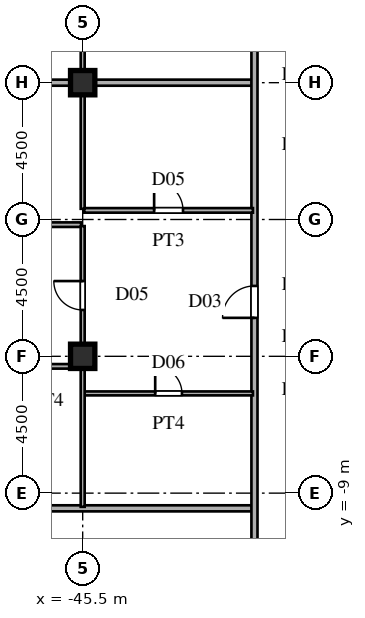
"""IFC4 building model, lengths in metres.
Left out: names, types, materials, properties, quantities, classifications, styles, units other than length and angle.
Written with IfcOpenShell. Run it as: python <this file> out.ifc"""

import sys

from ifc_helpers import new_model, si_unit, direction, frame, frame_2d, origin, origin_2d, place, context, subcontext, project, spatial, rectangle, i_section, extrude, source, transform, mapped, element, fill, save


model = new_model("IFC4")
c1 = context("Model", 3, precision=1e-05, world=origin(), true_north=direction((0.0, 1.0)))
c2 = subcontext(c1, "Body", "Model", "MODEL_VIEW")
j1 = project(units=[si_unit("LENGTHUNIT", "METRE"), si_unit("PLANEANGLEUNIT", "RADIAN")], contexts=[c1])
p1 = place(None, origin())
s1 = spatial("IfcSite", under=j1, at=p1, CompositionType="ELEMENT")
p2 = place(p1, origin())
s2 = spatial("IfcBuilding", under=s1, at=p2, CompositionType="ELEMENT")
p3 = place(p2, frame((0.0, 0.0, 80.1)))
s3 = spatial("IfcBuildingStorey", under=s2, at=p3, CompositionType="ELEMENT", Elevation=80.1)
m1 = source(origin(), c2, "Body", "SweptSolid", [
    extrude(i_section(OverallWidth=0.8, OverallDepth=0.8, WebThickness=0.032, FlangeThickness=0.05, at=origin_2d()), origin(), (0.0, 0.0, 1.0), 3.6),
])
for number, where, z_axis, x_axis in (
    (1, (-45.5, -4.5, 0.0), (0.0, 0.0, 1.0), (1.0, 0.0, 0.0)),
    (2, (-45.5, 4.5, 0.0), (0.0, 0.0, 1.0), (1.0, 0.0, 0.0)),
):
    element("IfcColumn", number, at=place(p3, frame(where, z_axis=z_axis, x_axis=x_axis)), inside=s3, PredefinedType="COLUMN", context=c2, shape_type="MappedRepresentation", body=[
        mapped(m1, transform((0.0, 0.0, 0.0), scale=1.0)),
    ])
p4 = place(p3, frame((-66.568, -9.5, 0.0), z_axis=(0.0, 0.0, 1.0), x_axis=(1.0, 0.0, 0.0)))
e3 = element("IfcWall", 3, at=p4, inside=s3, PredefinedType="PARTITIONING", context=c2, shape_type="SweptSolid", body=[
    extrude(rectangle(XDim=26.638, YDim=0.2, at=frame_2d((13.319, 0.0))), origin(), (0.0, 0.0, 1.0), 3.38),
])
p5 = place(p3, frame((-45.45, -5.72, 0.0), z_axis=(0.0, 0.0, 1.0), x_axis=(1.0, 0.0, 0.0)))
e4 = element("IfcWall", 4, at=p5, inside=s3, PredefinedType="PARTITIONING", context=c2, shape_type="SweptSolid", body=[
    extrude(rectangle(XDim=5.55, YDim=0.13, at=frame_2d((2.775, 0.0))), origin(), (0.0, 0.0, 1.0), 3.38),
])
p6 = place(p5, frame((2.335, 0.0, 0.0)))
e5 = element("IfcOpeningElement", 5, at=p6, cuts=e4, PredefinedType="OPENING", context=c2, shape_type="SweptSolid", body=[
    extrude(rectangle(XDim=0.88, YDim=2.1, at=frame_2d((0.44, 1.05))), frame((0.0, 0.075, 0.0), z_axis=(0.0, -1.0, 0.0), x_axis=(1.0, 0.0, 0.0)), (0.0, 0.0, 1.0), 0.15),
])
p7 = place(p3, frame((-71.035, -4.83, 0.0), z_axis=(0.0, 0.0, 1.0), x_axis=(1.0, 0.0, 0.0)))
e6 = element("IfcWall", 6, at=p7, inside=s3, PredefinedType="PARTITIONING", context=c2, shape_type="SweptSolid", body=[
    extrude(rectangle(XDim=25.485, YDim=0.15, at=frame_2d((12.742, 0.0))), origin(), (0.0, 0.0, 1.0), 3.38),
])
p8 = place(p7, frame((20.56, 0.0, 0.0)))
e7 = element("IfcOpeningElement", 7, at=p8, cuts=e6, PredefinedType="OPENING", context=c2, shape_type="SweptSolid", body=[
    extrude(rectangle(XDim=0.95, YDim=2.15, at=frame_2d((0.475, 1.075))), frame((0.0, 0.085, 0.0), z_axis=(0.0, -1.0, 0.0), x_axis=(1.0, 0.0, 0.0)), (0.0, 0.0, 1.0), 0.17),
])
p9 = place(p7, frame((13.21, 0.0, 0.0)))
e8 = element("IfcOpeningElement", 8, at=p9, cuts=e6, PredefinedType="OPENING", context=c2, shape_type="SweptSolid", body=[
    extrude(rectangle(XDim=0.95, YDim=2.15, at=frame_2d((0.475, 1.075))), frame((0.0, 0.085, 0.0), z_axis=(0.0, -1.0, 0.0), x_axis=(1.0, 0.0, 0.0)), (0.0, 0.0, 1.0), 0.17),
])
p10 = place(p3, frame((-71.035, -0.17, 0.0), z_axis=(0.0, 0.0, 1.0), x_axis=(1.0, 0.0, 0.0)))
e9 = element("IfcWall", 9, at=p10, inside=s3, PredefinedType="PARTITIONING", context=c2, shape_type="SweptSolid", body=[
    extrude(rectangle(XDim=25.485, YDim=0.15, at=frame_2d((12.742, 0.0))), origin(), (0.0, 0.0, 1.0), 3.38),
])
p11 = place(p10, frame((20.56, 0.0, 0.0)))
e10 = element("IfcOpeningElement", 10, at=p11, cuts=e9, PredefinedType="OPENING", context=c2, shape_type="SweptSolid", body=[
    extrude(rectangle(XDim=0.95, YDim=2.15, at=frame_2d((0.475, 1.075))), frame((0.0, 0.085, 0.0), z_axis=(0.0, -1.0, 0.0), x_axis=(1.0, 0.0, 0.0)), (0.0, 0.0, 1.0), 0.17),
])
p12 = place(p10, frame((13.21, 0.0, 0.0)))
e11 = element("IfcOpeningElement", 11, at=p12, cuts=e9, PredefinedType="OPENING", context=c2, shape_type="SweptSolid", body=[
    extrude(rectangle(XDim=0.95, YDim=2.15, at=frame_2d((0.475, 1.075))), frame((0.0, 0.085, 0.0), z_axis=(0.0, -1.0, 0.0), x_axis=(1.0, 0.0, 0.0)), (0.0, 0.0, 1.0), 0.17),
])
p13 = place(p3, frame((-45.45, 0.3, 0.0), z_axis=(0.0, 0.0, 1.0), x_axis=(1.0, 0.0, 0.0)))
e12 = element("IfcWall", 12, at=p13, inside=s3, PredefinedType="PARTITIONING", context=c2, shape_type="SweptSolid", body=[
    extrude(rectangle(XDim=5.55, YDim=0.15, at=frame_2d((2.775, 0.0))), origin(), (0.0, 0.0, 1.0), 3.38),
])
p14 = place(p13, frame((2.3, 0.0, 0.0)))
e13 = element("IfcOpeningElement", 13, at=p14, cuts=e12, PredefinedType="OPENING", context=c2, shape_type="SweptSolid", body=[
    extrude(rectangle(XDim=0.95, YDim=2.15, at=frame_2d((0.475, 1.075))), frame((0.0, 0.085, 0.0), z_axis=(0.0, -1.0, 0.0), x_axis=(1.0, 0.0, 0.0)), (0.0, 0.0, 1.0), 0.17),
])
p15 = place(p3, frame((-54.52, 4.5, 0.0), z_axis=(0.0, 0.0, 1.0), x_axis=(1.0, 0.0, 0.0)))
e14 = element("IfcWall", 14, at=p15, inside=s3, PredefinedType="PARTITIONING", context=c2, shape_type="SweptSolid", body=[
    extrude(rectangle(XDim=14.59, YDim=0.2, at=frame_2d((7.295, 0.0))), origin(), (0.0, 0.0, 1.0), 2.68),
])
p16 = place(p3, frame((-45.5, -9.45, 0.0), z_axis=(0.0, 0.0, 1.0), x_axis=(0.0, 1.0, 0.0)))
e15 = element("IfcWall", 15, at=p16, inside=s3, PredefinedType="PARTITIONING", context=c2, shape_type="SweptSolid", body=[
    extrude(rectangle(XDim=9.233, YDim=0.13, at=frame_2d((4.616, 0.0))), origin(), (0.0, 0.0, 1.0), 2.68),
])
p17 = place(p16, frame((6.475, 0.0, 0.0)))
e16 = element("IfcOpeningElement", 16, at=p17, cuts=e15, PredefinedType="OPENING", context=c2, shape_type="SweptSolid", body=[
    extrude(rectangle(XDim=0.95, YDim=2.15, at=frame_2d((0.475, 1.075))), frame((0.0, 0.075, 0.0), z_axis=(0.0, -1.0, 0.0), x_axis=(1.0, 0.0, 0.0)), (0.0, 0.0, 1.0), 0.15),
])
p18 = place(p3, frame((-45.5, 0.352, 0.0), z_axis=(0.0, 0.0, 1.0), x_axis=(0.0, 1.0, 0.0)))
e17 = element("IfcWall", 17, at=p18, inside=s3, PredefinedType="PARTITIONING", context=c2, shape_type="SweptSolid", body=[
    extrude(rectangle(XDim=8.176, YDim=0.13, at=frame_2d((4.088, 0.0))), origin(), (0.0, 0.0, 1.0), 2.68),
])
p19 = place(p3, frame((-39.85, -15.515, 0.0), z_axis=(0.0, 0.0, 1.0), x_axis=(0.0, 1.0, 0.0)))
e18 = element("IfcWall", 18, at=p19, inside=s3, PredefinedType="PARTITIONING", context=c2, shape_type="SweptSolid", body=[
    extrude(rectangle(XDim=31.03, YDim=0.2, at=frame_2d((15.515, 0.0))), origin(), (0.0, 0.0, 1.0), 3.38),
])
p20 = place(p19, frame((2.44, 0.0, 0.0)))
e19 = element("IfcOpeningElement", 19, at=p20, cuts=e18, PredefinedType="OPENING", context=c2, shape_type="SweptSolid", body=[
    extrude(rectangle(XDim=1.05, YDim=2.25, at=frame_2d((0.525, 1.125))), frame((0.0, 0.11, 0.0), z_axis=(0.0, -1.0, 0.0), x_axis=(1.0, 0.0, 0.0)), (0.0, 0.0, 1.0), 0.22),
])
p21 = place(p19, frame((12.28, 0.0, 0.0)))
e20 = element("IfcOpeningElement", 20, at=p21, cuts=e18, PredefinedType="OPENING", context=c2, shape_type="SweptSolid", body=[
    extrude(rectangle(XDim=1.05, YDim=2.25, at=frame_2d((0.525, 1.125))), frame((0.0, 0.11, 0.0), z_axis=(0.0, -1.0, 0.0), x_axis=(1.0, 0.0, 0.0)), (0.0, 0.0, 1.0), 0.22),
])
p22 = place(p19, frame((25.067, 0.0, 0.0)))
e21 = element("IfcOpeningElement", 21, at=p22, cuts=e18, PredefinedType="OPENING", context=c2, shape_type="SweptSolid", body=[
    extrude(rectangle(XDim=1.05, YDim=2.25, at=frame_2d((0.525, 1.125))), frame((0.0, 0.11, 0.0), z_axis=(0.0, -1.0, 0.0), x_axis=(1.0, 0.0, 0.0)), (0.0, 0.0, 1.0), 0.22),
])
m2 = source(origin(), c2, "Body", "SweptSolid", [
    extrude(rectangle(XDim=0.88, YDim=2.1, at=frame_2d((0.44, 1.05))), frame((0.0, 0.025, 0.0), z_axis=(0.0, -1.0, 0.0), x_axis=(1.0, 0.0, 0.0)), (0.0, 0.0, 1.0), 0.05),
])
p23 = place(p6, origin())
e22 = element("IfcDoor", 22, at=p23, inside=s3, OperationType="SINGLE_SWING_LEFT", PredefinedType="DOOR", context=c2, shape_type="MappedRepresentation", body=[
    mapped(m2, transform((0.0, 0.0, 0.0), scale=1.0)),
])
fill(e5, e22)
m3 = source(origin(), c2, "Body", "SweptSolid", [
    extrude(rectangle(XDim=0.95, YDim=2.15, at=frame_2d((0.475, 1.075))), frame((0.0, 0.025, 0.0), z_axis=(0.0, -1.0, 0.0), x_axis=(1.0, 0.0, 0.0)), (0.0, 0.0, 1.0), 0.05),
])
p24 = place(p14, origin())
e23 = element("IfcDoor", 23, at=p24, inside=s3, OperationType="SINGLE_SWING_LEFT", PredefinedType="DOOR", context=c2, shape_type="MappedRepresentation", body=[
    mapped(m3, transform((0.0, 0.0, 0.0), scale=1.0)),
])
fill(e13, e23)
p25 = place(p17, origin())
e24 = element("IfcDoor", 24, at=p25, inside=s3, OperationType="SINGLE_SWING_RIGHT", PredefinedType="DOOR", context=c2, shape_type="MappedRepresentation", body=[
    mapped(m3, transform((0.0, 0.0, 0.0), scale=1.0)),
])
fill(e16, e24)
m4 = source(origin(), c2, "Body", "SweptSolid", [
    extrude(rectangle(XDim=1.05, YDim=2.25, at=frame_2d((0.525, 1.125))), frame((0.0, 0.025, 0.0), z_axis=(0.0, -1.0, 0.0), x_axis=(1.0, 0.0, 0.0)), (0.0, 0.0, 1.0), 0.05),
])
p26 = place(p21, origin())
e25 = element("IfcDoor", 25, at=p26, inside=s3, OperationType="SINGLE_SWING_LEFT", PredefinedType="DOOR", context=c2, shape_type="MappedRepresentation", body=[
    mapped(m4, transform((0.0, 0.0, 0.0), scale=1.0)),
])
fill(e20, e25)
save(model, sys.argv[1])
